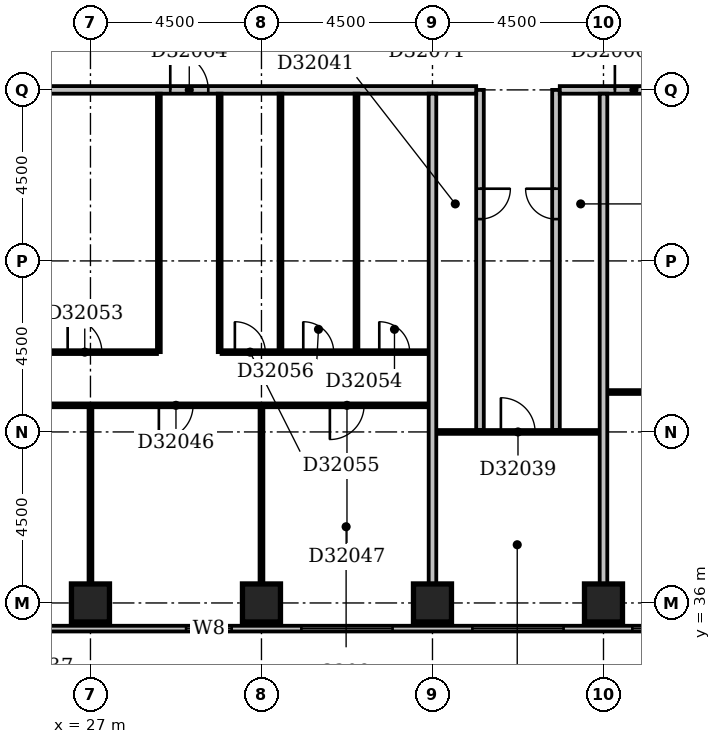
"""IFC4 building model, lengths in metres.
Left out: names, types, materials, properties, quantities, classifications, styles, units other than length and angle.
Written with IfcOpenShell. Run it as: python <this file> out.ifc"""

import sys

from ifc_helpers import new_model, si_unit, direction, frame, frame_2d, origin, origin_2d, place, context, subcontext, project, spatial, rectangle, extrude, element, fill, save


model = new_model("IFC4")
c1 = context("Model", 3, precision=1e-05, world=origin(), true_north=direction((0.0, 1.0)))
c2 = subcontext(c1, "Body", "Model", "MODEL_VIEW")
j1 = project(units=[si_unit("LENGTHUNIT", "METRE"), si_unit("PLANEANGLEUNIT", "RADIAN")], contexts=[c1])
p1 = place(None, origin())
s1 = spatial("IfcSite", under=j1, at=p1, CompositionType="ELEMENT")
p2 = place(p1, origin())
s2 = spatial("IfcBuilding", under=s1, at=p2, CompositionType="ELEMENT")
p3 = place(p2, frame((0.0, 0.0, 130.4)))
s3 = spatial("IfcBuildingStorey", under=s2, at=p3, CompositionType="ELEMENT", Elevation=130.4)
for number, where, z_axis, x_axis in (
    (1, (27.0, 36.0, -0.3), (0.0, 0.0, 1.0), (1.0, 0.0, 0.0)),
    (2, (31.5, 36.0, -0.3), (0.0, 0.0, 1.0), (1.0, 0.0, 0.0)),
    (3, (36.0, 36.0, -0.3), (0.0, 0.0, 1.0), (1.0, 0.0, 0.0)),
    (4, (40.5, 36.0, -0.3), (0.0, 0.0, 1.0), (1.0, 0.0, 0.0)),
):
    element("IfcColumn", number, at=place(p3, frame(where, z_axis=z_axis, x_axis=x_axis)), inside=s3, PredefinedType="COLUMN", context=c2, shape_type="SweptSolid", body=[
        extrude(rectangle(XDim=1.0, YDim=1.0, at=origin_2d()), origin(), (0.0, 0.0, 1.0), 3.6),
    ])
p4 = place(p3, frame((23.1, 35.325, 0.0), z_axis=(0.0, 0.0, 1.0), x_axis=(1.0, 0.0, 0.0)))
e5 = element("IfcWall", 5, at=p4, inside=s3, PredefinedType="STANDARD", context=c2, shape_type="SweptSolid", body=[
    extrude(rectangle(XDim=45.15, YDim=0.15, at=frame_2d((22.575, 0.0))), origin(), (0.0, 0.0, 1.0), 2.7),
])
p5 = place(p4, frame((0.45, 0.0, 0.6)))
e6 = element("IfcOpeningElement", 6, at=p5, cuts=e5, PredefinedType="OPENING", context=c2, shape_type="SweptSolid", body=[
    extrude(rectangle(XDim=2.4, YDim=1.8, at=frame_2d((1.2, 0.9))), frame((0.0, 0.087, 0.0), z_axis=(0.0, -1.0, 0.0), x_axis=(1.0, 0.0, 0.0)), (0.0, 0.0, 1.0), 0.174),
])
p6 = place(p4, frame((6.417, 0.0, 0.6)))
e7 = element("IfcOpeningElement", 7, at=p6, cuts=e5, PredefinedType="OPENING", context=c2, shape_type="SweptSolid", body=[
    extrude(rectangle(XDim=1.2, YDim=1.8, at=frame_2d((0.6, 0.9))), frame((0.0, 0.087, 0.0), z_axis=(0.0, -1.0, 0.0), x_axis=(1.0, 0.0, 0.0)), (0.0, 0.0, 1.0), 0.174),
])
p7 = place(p4, frame((9.45, 0.0, 0.6)))
e8 = element("IfcOpeningElement", 8, at=p7, cuts=e5, PredefinedType="OPENING", context=c2, shape_type="SweptSolid", body=[
    extrude(rectangle(XDim=2.4, YDim=1.8, at=frame_2d((1.2, 0.9))), frame((0.0, 0.087, 0.0), z_axis=(0.0, -1.0, 0.0), x_axis=(1.0, 0.0, 0.0)), (0.0, 0.0, 1.0), 0.174),
])
p8 = place(p4, frame((13.95, 0.0, 0.6)))
e9 = element("IfcOpeningElement", 9, at=p8, cuts=e5, PredefinedType="OPENING", context=c2, shape_type="SweptSolid", body=[
    extrude(rectangle(XDim=2.4, YDim=1.8, at=frame_2d((1.2, 0.9))), frame((0.0, 0.087, 0.0), z_axis=(0.0, -1.0, 0.0), x_axis=(1.0, 0.0, 0.0)), (0.0, 0.0, 1.0), 0.174),
])
p9 = place(p4, frame((18.16, 0.0, 0.6)))
e10 = element("IfcOpeningElement", 10, at=p9, cuts=e5, PredefinedType="OPENING", context=c2, shape_type="SweptSolid", body=[
    extrude(rectangle(XDim=1.8, YDim=1.8, at=frame_2d((0.9, 0.9))), frame((0.0, 0.087, 0.0), z_axis=(0.0, -1.0, 0.0), x_axis=(1.0, 0.0, 0.0)), (0.0, 0.0, 1.0), 0.174),
])
p10 = place(p4, frame((22.95, 0.0, 0.6)))
e11 = element("IfcOpeningElement", 11, at=p10, cuts=e5, PredefinedType="OPENING", context=c2, shape_type="SweptSolid", body=[
    extrude(rectangle(XDim=2.4, YDim=1.8, at=frame_2d((1.2, 0.9))), frame((0.0, 0.087, 0.0), z_axis=(0.0, -1.0, 0.0), x_axis=(1.0, 0.0, 0.0)), (0.0, 0.0, 1.0), 0.174),
])
p11 = place(p4, frame((27.45, 0.0, 0.6)))
e12 = element("IfcOpeningElement", 12, at=p11, cuts=e5, PredefinedType="OPENING", context=c2, shape_type="SweptSolid", body=[
    extrude(rectangle(XDim=2.4, YDim=1.8, at=frame_2d((1.2, 0.9))), frame((0.0, 0.087, 0.0), z_axis=(0.0, -1.0, 0.0), x_axis=(1.0, 0.0, 0.0)), (0.0, 0.0, 1.0), 0.174),
])
p12 = place(p4, frame((31.631, 0.0, 0.6)))
e13 = element("IfcOpeningElement", 13, at=p12, cuts=e5, PredefinedType="OPENING", context=c2, shape_type="SweptSolid", body=[
    extrude(rectangle(XDim=0.9, YDim=1.8, at=frame_2d((0.45, 0.9))), frame((0.0, 0.087, 0.0), z_axis=(0.0, -1.0, 0.0), x_axis=(1.0, 0.0, 0.0)), (0.0, 0.0, 1.0), 0.174),
])
p13 = place(p4, frame((36.45, 0.0, 0.6)))
e14 = element("IfcOpeningElement", 14, at=p13, cuts=e5, PredefinedType="OPENING", context=c2, shape_type="SweptSolid", body=[
    extrude(rectangle(XDim=2.4, YDim=1.8, at=frame_2d((1.2, 0.9))), frame((0.0, 0.087, 0.0), z_axis=(0.0, -1.0, 0.0), x_axis=(1.0, 0.0, 0.0)), (0.0, 0.0, 1.0), 0.174),
])
p14 = place(p4, frame((40.95, 0.0, 0.6)))
e15 = element("IfcOpeningElement", 15, at=p14, cuts=e5, PredefinedType="OPENING", context=c2, shape_type="SweptSolid", body=[
    extrude(rectangle(XDim=2.4, YDim=1.8, at=frame_2d((1.2, 0.9))), frame((0.0, 0.087, 0.0), z_axis=(0.0, -1.0, 0.0), x_axis=(1.0, 0.0, 0.0)), (0.0, 0.0, 1.0), 0.174),
])
p15 = place(p3, frame((27.0, 36.5, 0.0), z_axis=(0.0, 0.0, 1.0), x_axis=(0.0, 1.0, 0.0)))
e16 = element("IfcWall", 16, at=p15, inside=s3, PredefinedType="PARTITIONING", context=c2, shape_type="SweptSolid", body=[
    extrude(rectangle(XDim=4.65, YDim=0.1, at=frame_2d((2.325, 0.0))), origin(), (0.0, 0.0, 1.0), 2.6),
])
p16 = place(p3, frame((31.5, 36.5, 0.0), z_axis=(0.0, 0.0, 1.0), x_axis=(0.0, 1.0, 0.0)))
e17 = element("IfcWall", 17, at=p16, inside=s3, PredefinedType="PARTITIONING", context=c2, shape_type="SweptSolid", body=[
    extrude(rectangle(XDim=4.65, YDim=0.1, at=frame_2d((2.325, 0.0))), origin(), (0.0, 0.0, 1.0), 3.3),
])
p17 = place(p3, frame((36.0, 36.5, 0.0), z_axis=(0.0, 0.0, 1.0), x_axis=(0.0, 1.0, 0.0)))
e18 = element("IfcWall", 18, at=p17, inside=s3, PredefinedType="PARTITIONING", context=c2, shape_type="SweptSolid", body=[
    extrude(rectangle(XDim=12.9, YDim=0.2, at=frame_2d((6.45, 0.0))), origin(), (0.0, 0.0, 1.0), 2.4),
])
p18 = place(p3, frame((40.5, 36.5, 0.0), z_axis=(0.0, 0.0, 1.0), x_axis=(0.0, 1.0, 0.0)))
e19 = element("IfcWall", 19, at=p18, inside=s3, PredefinedType="PARTITIONING", context=c2, shape_type="SweptSolid", body=[
    extrude(rectangle(XDim=12.9, YDim=0.2, at=frame_2d((6.45, 0.0))), origin(), (0.0, 0.0, 1.0), 3.3),
])
p19 = place(p3, frame((36.1, 40.5, 0.0), z_axis=(0.0, 0.0, 1.0), x_axis=(1.0, 0.0, 0.0)))
e20 = element("IfcWall", 20, at=p19, inside=s3, PredefinedType="PARTITIONING", context=c2, shape_type="SweptSolid", body=[
    extrude(rectangle(XDim=4.3, YDim=0.1, at=frame_2d((2.15, 0.0))), origin(), (0.0, 0.0, 1.0), 3.3),
])
p20 = place(p19, frame((1.7, 0.0, 0.0)))
e21 = element("IfcOpeningElement", 21, at=p20, cuts=e20, PredefinedType="OPENING", context=c2, shape_type="SweptSolid", body=[
    extrude(rectangle(XDim=0.9, YDim=2.1, at=frame_2d((0.45, 1.05))), frame((0.0, 0.062, 0.0), z_axis=(0.0, -1.0, 0.0), x_axis=(1.0, 0.0, 0.0)), (0.0, 0.0, 1.0), 0.124),
])
p21 = place(p3, frame((37.25, 40.55, 0.0), z_axis=(0.0, 0.0, 1.0), x_axis=(0.0, 1.0, 0.0)))
e22 = element("IfcWall", 22, at=p21, inside=s3, PredefinedType="PARTITIONING", context=c2, shape_type="SweptSolid", body=[
    extrude(rectangle(XDim=8.95, YDim=0.2, at=frame_2d((4.475, 0.0))), origin(), (0.0, 0.0, 1.0), 3.3),
])
p22 = place(p21, frame((5.55, 0.0, 0.0)))
e23 = element("IfcOpeningElement", 23, at=p22, cuts=e22, PredefinedType="OPENING", context=c2, shape_type="SweptSolid", body=[
    extrude(rectangle(XDim=0.8, YDim=2.1, at=frame_2d((0.4, 1.05))), frame((0.0, 0.112, 0.0), z_axis=(0.0, -1.0, 0.0), x_axis=(1.0, 0.0, 0.0)), (0.0, 0.0, 1.0), 0.224),
])
p23 = place(p3, frame((39.25, 40.55, 0.0), z_axis=(0.0, 0.0, 1.0), x_axis=(0.0, 1.0, 0.0)))
e24 = element("IfcWall", 24, at=p23, inside=s3, PredefinedType="PARTITIONING", context=c2, shape_type="SweptSolid", body=[
    extrude(rectangle(XDim=8.95, YDim=0.2, at=frame_2d((4.475, 0.0))), origin(), (0.0, 0.0, 1.0), 3.3),
])
p24 = place(p23, frame((5.55, 0.0, 0.0)))
e25 = element("IfcOpeningElement", 25, at=p24, cuts=e24, PredefinedType="OPENING", context=c2, shape_type="SweptSolid", body=[
    extrude(rectangle(XDim=0.8, YDim=2.1, at=frame_2d((0.4, 1.05))), frame((0.0, 0.112, 0.0), z_axis=(0.0, -1.0, 0.0), x_axis=(1.0, 0.0, 0.0)), (0.0, 0.0, 1.0), 0.224),
])
p25 = place(p3, frame((22.6, 41.2, 0.0), z_axis=(0.0, 0.0, 1.0), x_axis=(1.0, 0.0, 0.0)))
e26 = element("IfcWall", 26, at=p25, inside=s3, PredefinedType="PARTITIONING", context=c2, shape_type="SweptSolid", body=[
    extrude(rectangle(XDim=13.3, YDim=0.1, at=frame_2d((6.65, 0.0))), origin(), (0.0, 0.0, 1.0), 3.3),
])
p26 = place(p25, frame((1.7, 0.0, 0.0)))
e27 = element("IfcOpeningElement", 27, at=p26, cuts=e26, PredefinedType="OPENING", context=c2, shape_type="SweptSolid", body=[
    extrude(rectangle(XDim=0.9, YDim=2.1, at=frame_2d((0.45, 1.05))), frame((0.0, 0.062, 0.0), z_axis=(0.0, -1.0, 0.0), x_axis=(1.0, 0.0, 0.0)), (0.0, 0.0, 1.0), 0.124),
])
p27 = place(p25, frame((6.2, 0.0, 0.0)))
e28 = element("IfcOpeningElement", 28, at=p27, cuts=e26, PredefinedType="OPENING", context=c2, shape_type="SweptSolid", body=[
    extrude(rectangle(XDim=0.9, YDim=2.1, at=frame_2d((0.45, 1.05))), frame((0.0, 0.062, 0.0), z_axis=(0.0, -1.0, 0.0), x_axis=(1.0, 0.0, 0.0)), (0.0, 0.0, 1.0), 0.124),
])
p28 = place(p25, frame((10.7, 0.0, 0.0)))
e29 = element("IfcOpeningElement", 29, at=p28, cuts=e26, PredefinedType="OPENING", context=c2, shape_type="SweptSolid", body=[
    extrude(rectangle(XDim=0.9, YDim=2.1, at=frame_2d((0.45, 1.05))), frame((0.0, 0.062, 0.0), z_axis=(0.0, -1.0, 0.0), x_axis=(1.0, 0.0, 0.0)), (0.0, 0.0, 1.0), 0.124),
])
p29 = place(p3, frame((40.6, 41.55, 0.0), z_axis=(0.0, 0.0, 1.0), x_axis=(1.0, 0.0, 0.0)))
e30 = element("IfcWall", 30, at=p29, inside=s3, PredefinedType="PARTITIONING", context=c2, shape_type="SweptSolid", body=[
    extrude(rectangle(XDim=13.3, YDim=0.1, at=frame_2d((6.65, 0.0))), origin(), (0.0, 0.0, 1.0), 3.3),
])
p30 = place(p29, frame((3.9, 0.0, 0.0)))
e31 = element("IfcOpeningElement", 31, at=p30, cuts=e30, PredefinedType="OPENING", context=c2, shape_type="SweptSolid", body=[
    extrude(rectangle(XDim=0.9, YDim=2.1, at=frame_2d((0.45, 1.05))), frame((0.0, 0.062, 0.0), z_axis=(0.0, -1.0, 0.0), x_axis=(1.0, 0.0, 0.0)), (0.0, 0.0, 1.0), 0.124),
])
p31 = place(p29, frame((10.7, 0.0, 0.0)))
e32 = element("IfcOpeningElement", 32, at=p31, cuts=e30, PredefinedType="OPENING", context=c2, shape_type="SweptSolid", body=[
    extrude(rectangle(XDim=0.9, YDim=2.1, at=frame_2d((0.45, 1.05))), frame((0.0, 0.062, 0.0), z_axis=(0.0, -1.0, 0.0), x_axis=(1.0, 0.0, 0.0)), (0.0, 0.0, 1.0), 0.124),
])
p32 = place(p3, frame((22.6, 42.6, 0.0), z_axis=(0.0, 0.0, 1.0), x_axis=(1.0, 0.0, 0.0)))
e33 = element("IfcWall", 33, at=p32, inside=s3, PredefinedType="PARTITIONING", context=c2, shape_type="SweptSolid", body=[
    extrude(rectangle(XDim=6.15, YDim=0.1, at=frame_2d((3.075, 0.0))), origin(), (0.0, 0.0, 1.0), 3.3),
])
p33 = place(p32, frame((0.7, 0.0, 0.0)))
e34 = element("IfcOpeningElement", 34, at=p33, cuts=e33, PredefinedType="OPENING", context=c2, shape_type="SweptSolid", body=[
    extrude(rectangle(XDim=0.8, YDim=2.1, at=frame_2d((0.4, 1.05))), frame((0.0, 0.062, 0.0), z_axis=(0.0, -1.0, 0.0), x_axis=(1.0, 0.0, 0.0)), (0.0, 0.0, 1.0), 0.124),
])
p34 = place(p32, frame((3.8, 0.0, 0.0)))
e35 = element("IfcOpeningElement", 35, at=p34, cuts=e33, PredefinedType="OPENING", context=c2, shape_type="SweptSolid", body=[
    extrude(rectangle(XDim=0.9, YDim=2.1, at=frame_2d((0.45, 1.05))), frame((0.0, 0.062, 0.0), z_axis=(0.0, -1.0, 0.0), x_axis=(1.0, 0.0, 0.0)), (0.0, 0.0, 1.0), 0.124),
])
for number, where, z_axis, x_axis in (
    (36, (28.8, 42.6, 0.0), (0.0, 0.0, 1.0), (0.0, 1.0, 0.0)),
    (37, (30.4, 42.6, 0.0), (0.0, 0.0, 1.0), (0.0, 1.0, 0.0)),
):
    element("IfcWall", number, at=place(p3, frame(where, z_axis=z_axis, x_axis=x_axis)), inside=s3, PredefinedType="PARTITIONING", context=c2, shape_type="SweptSolid", body=[
        extrude(rectangle(XDim=6.8, YDim=0.1, at=frame_2d((3.4, 0.0))), origin(), (0.0, 0.0, 1.0), 3.3),
    ])
p35 = place(p3, frame((30.45, 42.6, 0.0), z_axis=(0.0, 0.0, 1.0), x_axis=(1.0, 0.0, 0.0)))
e38 = element("IfcWall", 38, at=p35, inside=s3, PredefinedType="PARTITIONING", context=c2, shape_type="SweptSolid", body=[
    extrude(rectangle(XDim=5.45, YDim=0.1, at=frame_2d((2.725, 0.0))), origin(), (0.0, 0.0, 1.0), 3.3),
])
p36 = place(p35, frame((4.15, 0.0, 0.0)))
e39 = element("IfcOpeningElement", 39, at=p36, cuts=e38, PredefinedType="OPENING", context=c2, shape_type="SweptSolid", body=[
    extrude(rectangle(XDim=0.8, YDim=2.1, at=frame_2d((0.4, 1.05))), frame((0.0, 0.062, 0.0), z_axis=(0.0, -1.0, 0.0), x_axis=(1.0, 0.0, 0.0)), (0.0, 0.0, 1.0), 0.124),
])
p37 = place(p35, frame((0.35, 0.0, 0.0)))
e40 = element("IfcOpeningElement", 40, at=p37, cuts=e38, PredefinedType="OPENING", context=c2, shape_type="SweptSolid", body=[
    extrude(rectangle(XDim=0.8, YDim=2.1, at=frame_2d((0.4, 1.05))), frame((0.0, 0.062, 0.0), z_axis=(0.0, -1.0, 0.0), x_axis=(1.0, 0.0, 0.0)), (0.0, 0.0, 1.0), 0.124),
])
p38 = place(p35, frame((2.15, 0.0, 0.0)))
e41 = element("IfcOpeningElement", 41, at=p38, cuts=e38, PredefinedType="OPENING", context=c2, shape_type="SweptSolid", body=[
    extrude(rectangle(XDim=0.8, YDim=2.1, at=frame_2d((0.4, 1.05))), frame((0.0, 0.062, 0.0), z_axis=(0.0, -1.0, 0.0), x_axis=(1.0, 0.0, 0.0)), (0.0, 0.0, 1.0), 0.124),
])
for number, where, z_axis, x_axis in (
    (42, (32.0, 42.65, 0.0), (0.0, 0.0, 1.0), (0.0, 1.0, 0.0)),
    (43, (34.0, 42.65, 0.0), (0.0, 0.0, 1.0), (0.0, 1.0, 0.0)),
):
    element("IfcWall", number, at=place(p3, frame(where, z_axis=z_axis, x_axis=x_axis)), inside=s3, PredefinedType="PARTITIONING", context=c2, shape_type="SweptSolid", body=[
        extrude(rectangle(XDim=6.75, YDim=0.1, at=frame_2d((3.375, 0.0))), origin(), (0.0, 0.0, 1.0), 3.3),
    ])
p39 = place(p3, frame((9.1, 49.5, 0.0), z_axis=(0.0, 0.0, 1.0), x_axis=(1.0, 0.0, 0.0)))
e44 = element("IfcWall", 44, at=p39, inside=s3, PredefinedType="PARTITIONING", context=c2, shape_type="SweptSolid", body=[
    extrude(rectangle(XDim=28.05, YDim=0.2, at=frame_2d((14.025, 0.0))), origin(), (0.0, 0.0, 1.0), 3.3),
])
p40 = place(p39, frame((20.0, 0.0, 0.0)))
e45 = element("IfcOpeningElement", 45, at=p40, cuts=e44, PredefinedType="OPENING", context=c2, shape_type="SweptSolid", body=[
    extrude(rectangle(XDim=1.0, YDim=2.1, at=frame_2d((0.5, 1.05))), frame((0.0, 0.112, 0.0), z_axis=(0.0, -1.0, 0.0), x_axis=(1.0, 0.0, 0.0)), (0.0, 0.0, 1.0), 0.224),
])
p41 = place(p39, frame((3.9, 0.0, 0.0)))
e46 = element("IfcOpeningElement", 46, at=p41, cuts=e44, PredefinedType="OPENING", context=c2, shape_type="SweptSolid", body=[
    extrude(rectangle(XDim=0.9, YDim=2.1, at=frame_2d((0.45, 1.05))), frame((0.0, 0.112, 0.0), z_axis=(0.0, -1.0, 0.0), x_axis=(1.0, 0.0, 0.0)), (0.0, 0.0, 1.0), 0.224),
])
p42 = place(p3, frame((39.35, 49.5, 0.0), z_axis=(0.0, 0.0, 1.0), x_axis=(1.0, 0.0, 0.0)))
e47 = element("IfcWall", 47, at=p42, inside=s3, PredefinedType="PARTITIONING", context=c2, shape_type="SweptSolid", body=[
    extrude(rectangle(XDim=15.8, YDim=0.2, at=frame_2d((7.9, 0.0))), origin(), (0.0, 0.0, 1.0), 3.3),
])
p43 = place(p42, frame((1.45, 0.0, 0.0)))
e48 = element("IfcOpeningElement", 48, at=p43, cuts=e47, PredefinedType="OPENING", context=c2, shape_type="SweptSolid", body=[
    extrude(rectangle(XDim=1.0, YDim=2.1, at=frame_2d((0.5, 1.05))), frame((0.0, 0.112, 0.0), z_axis=(0.0, -1.0, 0.0), x_axis=(1.0, 0.0, 0.0)), (0.0, 0.0, 1.0), 0.224),
])
p44 = place(p6, origin())
e49 = element("IfcWindow", 49, at=p44, inside=s3, PartitioningType="SINGLE_PANEL", PredefinedType="WINDOW", context=c2, shape_type="SweptSolid", body=[
    extrude(rectangle(XDim=1.2, YDim=1.8, at=frame_2d((0.6, 0.9))), frame((0.0, 0.03, 0.0), z_axis=(0.0, -1.0, 0.0), x_axis=(1.0, 0.0, 0.0)), (0.0, 0.0, 1.0), 0.06),
])
fill(e7, e49)
p45 = place(p7, origin())
e50 = element("IfcWindow", 50, at=p45, inside=s3, PartitioningType="SINGLE_PANEL", PredefinedType="WINDOW", context=c2, shape_type="SweptSolid", body=[
    extrude(rectangle(XDim=2.4, YDim=1.8, at=frame_2d((1.2, 0.9))), frame((0.0, 0.03, 0.0), z_axis=(0.0, -1.0, 0.0), x_axis=(1.0, 0.0, 0.0)), (0.0, 0.0, 1.0), 0.06),
])
fill(e8, e50)
p46 = place(p8, origin())
e51 = element("IfcWindow", 51, at=p46, inside=s3, PartitioningType="SINGLE_PANEL", PredefinedType="WINDOW", context=c2, shape_type="SweptSolid", body=[
    extrude(rectangle(XDim=2.4, YDim=1.8, at=frame_2d((1.2, 0.9))), frame((0.0, 0.03, 0.0), z_axis=(0.0, -1.0, 0.0), x_axis=(1.0, 0.0, 0.0)), (0.0, 0.0, 1.0), 0.06),
])
fill(e9, e51)
p47 = place(p9, origin())
e52 = element("IfcWindow", 52, at=p47, inside=s3, PartitioningType="SINGLE_PANEL", PredefinedType="WINDOW", context=c2, shape_type="SweptSolid", body=[
    extrude(rectangle(XDim=1.8, YDim=1.8, at=frame_2d((0.9, 0.9))), frame((0.0, 0.03, 0.0), z_axis=(0.0, -1.0, 0.0), x_axis=(1.0, 0.0, 0.0)), (0.0, 0.0, 1.0), 0.06),
])
fill(e10, e52)
p48 = place(p20, origin())
e53 = element("IfcDoor", 53, at=p48, inside=s3, OperationType="SINGLE_SWING_LEFT", PredefinedType="DOOR", context=c2, shape_type="SweptSolid", body=[
    extrude(rectangle(XDim=0.9, YDim=2.1, at=frame_2d((0.45, 1.05))), frame((0.0, 0.025, 0.0), z_axis=(0.0, -1.0, 0.0), x_axis=(1.0, 0.0, 0.0)), (0.0, 0.0, 1.0), 0.05),
])
fill(e21, e53)
p49 = place(p22, origin())
e54 = element("IfcDoor", 54, at=p49, inside=s3, OperationType="SINGLE_SWING_RIGHT", PredefinedType="DOOR", context=c2, shape_type="SweptSolid", body=[
    extrude(rectangle(XDim=0.8, YDim=2.1, at=frame_2d((0.4, 1.05))), frame((0.0, 0.025, 0.0), z_axis=(0.0, -1.0, 0.0), x_axis=(1.0, 0.0, 0.0)), (0.0, 0.0, 1.0), 0.05),
])
fill(e23, e54)
p50 = place(p24, frame((0.8, 0.0, 0.0), z_axis=(0.0, 0.0, 1.0), x_axis=(-1.0, 0.0, 0.0)))
e55 = element("IfcDoor", 55, at=p50, inside=s3, OperationType="SINGLE_SWING_LEFT", PredefinedType="DOOR", context=c2, shape_type="SweptSolid", body=[
    extrude(rectangle(XDim=0.8, YDim=2.1, at=frame_2d((0.4, 1.05))), frame((0.0, 0.025, 0.0), z_axis=(0.0, -1.0, 0.0), x_axis=(1.0, 0.0, 0.0)), (0.0, 0.0, 1.0), 0.05),
])
fill(e25, e55)
p51 = place(p27, frame((0.9, 0.0, 0.0), z_axis=(0.0, 0.0, 1.0), x_axis=(-1.0, 0.0, 0.0)))
e56 = element("IfcDoor", 56, at=p51, inside=s3, OperationType="SINGLE_SWING_RIGHT", PredefinedType="DOOR", context=c2, shape_type="SweptSolid", body=[
    extrude(rectangle(XDim=0.9, YDim=2.1, at=frame_2d((0.45, 1.05))), frame((0.0, 0.025, 0.0), z_axis=(0.0, -1.0, 0.0), x_axis=(1.0, 0.0, 0.0)), (0.0, 0.0, 1.0), 0.05),
])
fill(e28, e56)
p52 = place(p28, frame((0.9, 0.0, 0.0), z_axis=(0.0, 0.0, 1.0), x_axis=(-1.0, 0.0, 0.0)))
e57 = element("IfcDoor", 57, at=p52, inside=s3, OperationType="SINGLE_SWING_RIGHT", PredefinedType="DOOR", context=c2, shape_type="SweptSolid", body=[
    extrude(rectangle(XDim=0.9, YDim=2.1, at=frame_2d((0.45, 1.05))), frame((0.0, 0.025, 0.0), z_axis=(0.0, -1.0, 0.0), x_axis=(1.0, 0.0, 0.0)), (0.0, 0.0, 1.0), 0.05),
])
fill(e29, e57)
p53 = place(p34, origin())
e58 = element("IfcDoor", 58, at=p53, inside=s3, OperationType="SINGLE_SWING_LEFT", PredefinedType="DOOR", context=c2, shape_type="SweptSolid", body=[
    extrude(rectangle(XDim=0.9, YDim=2.1, at=frame_2d((0.45, 1.05))), frame((0.0, 0.025, 0.0), z_axis=(0.0, -1.0, 0.0), x_axis=(1.0, 0.0, 0.0)), (0.0, 0.0, 1.0), 0.05),
])
fill(e35, e58)
p54 = place(p36, origin())
e59 = element("IfcDoor", 59, at=p54, inside=s3, OperationType="SINGLE_SWING_LEFT", PredefinedType="DOOR", context=c2, shape_type="SweptSolid", body=[
    extrude(rectangle(XDim=0.8, YDim=2.1, at=frame_2d((0.4, 1.05))), frame((0.0, 0.025, 0.0), z_axis=(0.0, -1.0, 0.0), x_axis=(1.0, 0.0, 0.0)), (0.0, 0.0, 1.0), 0.05),
])
fill(e39, e59)
p55 = place(p37, origin())
e60 = element("IfcDoor", 60, at=p55, inside=s3, OperationType="SINGLE_SWING_LEFT", PredefinedType="DOOR", context=c2, shape_type="SweptSolid", body=[
    extrude(rectangle(XDim=0.8, YDim=2.1, at=frame_2d((0.4, 1.05))), frame((0.0, 0.025, 0.0), z_axis=(0.0, -1.0, 0.0), x_axis=(1.0, 0.0, 0.0)), (0.0, 0.0, 1.0), 0.05),
])
fill(e40, e60)
p56 = place(p38, origin())
e61 = element("IfcDoor", 61, at=p56, inside=s3, OperationType="SINGLE_SWING_LEFT", PredefinedType="DOOR", context=c2, shape_type="SweptSolid", body=[
    extrude(rectangle(XDim=0.8, YDim=2.1, at=frame_2d((0.4, 1.05))), frame((0.0, 0.025, 0.0), z_axis=(0.0, -1.0, 0.0), x_axis=(1.0, 0.0, 0.0)), (0.0, 0.0, 1.0), 0.05),
])
fill(e41, e61)
p57 = place(p40, origin())
e62 = element("IfcDoor", 62, at=p57, inside=s3, OperationType="SINGLE_SWING_LEFT", PredefinedType="DOOR", context=c2, shape_type="SweptSolid", body=[
    extrude(rectangle(XDim=1.0, YDim=2.1, at=frame_2d((0.5, 1.05))), frame((0.0, 0.025, 0.0), z_axis=(0.0, -1.0, 0.0), x_axis=(1.0, 0.0, 0.0)), (0.0, 0.0, 1.0), 0.05),
])
fill(e45, e62)
p58 = place(p43, origin())
e63 = element("IfcDoor", 63, at=p58, inside=s3, OperationType="SINGLE_SWING_LEFT", PredefinedType="DOOR", context=c2, shape_type="SweptSolid", body=[
    extrude(rectangle(XDim=1.0, YDim=2.1, at=frame_2d((0.5, 1.05))), frame((0.0, 0.025, 0.0), z_axis=(0.0, -1.0, 0.0), x_axis=(1.0, 0.0, 0.0)), (0.0, 0.0, 1.0), 0.05),
])
fill(e48, e63)
save(model, sys.argv[1])
